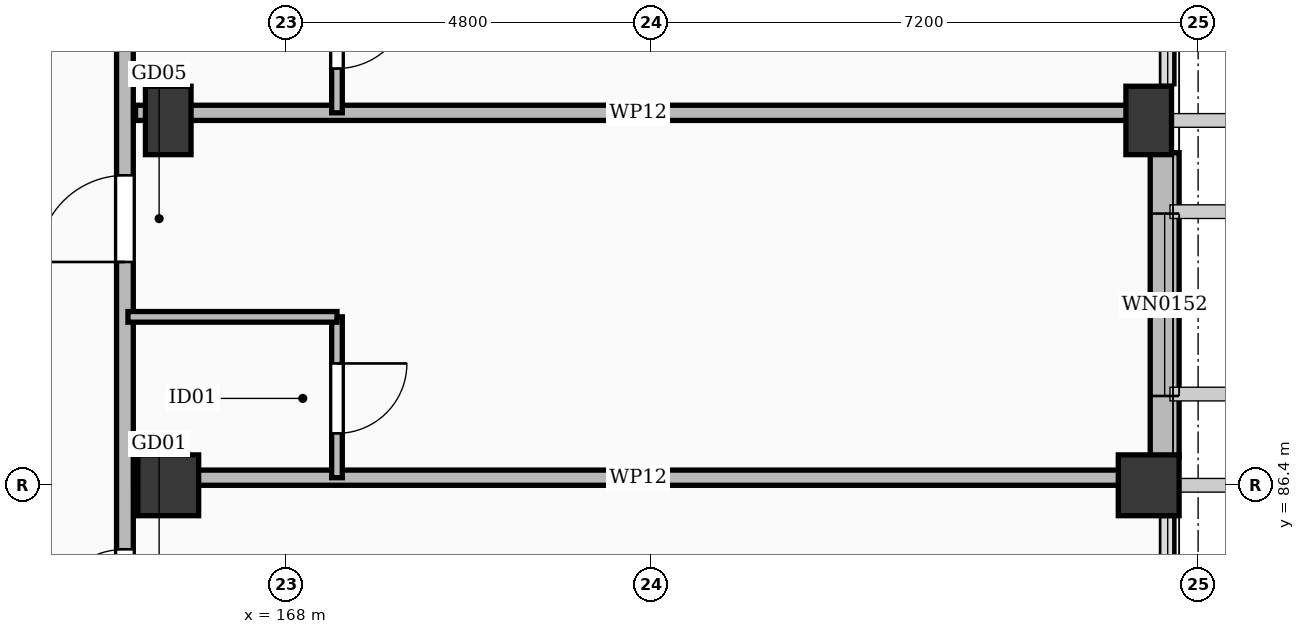
"""IFC4 building model, lengths in metres.
Left out: names, types, materials, properties, quantities, classifications, styles, units other than length and angle.
Written with IfcOpenShell. Run it as: python <this file> out.ifc"""

import sys

from ifc_helpers import new_model, si_unit, direction, frame, frame_2d, origin, origin_2d, place, context, subcontext, project, spatial, rectangle, extrude, element, fill, save


model = new_model("IFC4")
c1 = context("Model", 3, precision=1e-05, world=origin(), true_north=direction((0.0, 1.0)))
c2 = subcontext(c1, "Body", "Model", "MODEL_VIEW")
j1 = project(units=[si_unit("LENGTHUNIT", "METRE"), si_unit("PLANEANGLEUNIT", "RADIAN")], contexts=[c1])
p1 = place(None, origin())
s1 = spatial("IfcSite", under=j1, at=p1, CompositionType="ELEMENT")
p2 = place(p1, origin())
s2 = spatial("IfcBuilding", under=s1, at=p2, CompositionType="ELEMENT")
p3 = place(p2, frame((0.0, 0.0, 21.0)))
s3 = spatial("IfcBuildingStorey", under=s2, at=p3, CompositionType="ELEMENT", Elevation=21.0)
for number, where, z_axis, x_axis in (
    (1, (166.45, 86.4, 0.0), (0.0, 0.0, 1.0), (1.0, 0.0, 0.0)),
    (2, (179.35, 86.4, 0.0), (0.0, 0.0, 1.0), (1.0, 0.0, 0.0)),
):
    element("IfcColumn", number, at=place(p3, frame(where, z_axis=z_axis, x_axis=x_axis)), inside=s3, PredefinedType="COLUMN", context=c2, shape_type="SweptSolid", body=[
        extrude(rectangle(XDim=0.8, YDim=0.8, at=origin_2d()), origin(), (0.0, 0.0, 1.0), 3.6),
    ])
for number, where, z_axis, x_axis in (
    (3, (166.45, 91.2, -0.26), (0.0, 0.0, 1.0), (1.0, 0.0, 0.0)),
    (4, (179.35, 91.2, -0.26), (0.0, 0.0, 1.0), (1.0, 0.0, 0.0)),
):
    element("IfcColumn", number, at=place(p3, frame(where, z_axis=z_axis, x_axis=x_axis)), inside=s3, PredefinedType="COLUMN", context=c2, shape_type="SweptSolid", body=[
        extrude(rectangle(XDim=0.6, YDim=0.9, at=origin_2d()), origin(), (0.0, 0.0, 1.0), 3.86),
    ])
p4 = place(p3, frame((179.56, 90.775, 0.0), z_axis=(0.0, 0.0, 1.0), x_axis=(0.0, -1.0, 0.0)))
e5 = element("IfcWall", 5, at=p4, inside=s3, PredefinedType="SOLIDWALL", context=c2, shape_type="SweptSolid", body=[
    extrude(rectangle(XDim=4.0, YDim=0.38, at=frame_2d((2.0, 0.0))), origin(), (0.0, 0.0, 1.0), 2.582),
])
p5 = place(p4, frame((0.8, 0.0, 0.55)))
e6 = element("IfcOpeningElement", 6, at=p5, cuts=e5, PredefinedType="OPENING", context=c2, shape_type="SweptSolid", body=[
    extrude(rectangle(XDim=2.4, YDim=1.8, at=frame_2d((1.2, 0.9))), frame((0.0, 0.202, 0.0), z_axis=(0.0, -1.0, 0.0), x_axis=(1.0, 0.0, 0.0)), (0.0, 0.0, 1.0), 0.404),
])
p6 = place(p3, frame((165.88, 65.4, 0.0), z_axis=(0.0, 0.0, 1.0), x_axis=(0.0, 1.0, 0.0)))
e7 = element("IfcWall", 7, at=p6, inside=s3, PredefinedType="PARTITIONING", context=c2, shape_type="SweptSolid", body=[
    extrude(rectangle(XDim=60.25, YDim=0.22, at=frame_2d((30.125, 0.0))), origin(), (0.0, 0.0, 1.0), 2.582),
])
p7 = place(p6, frame((4.388, 0.0, 0.0)))
e8 = element("IfcOpeningElement", 8, at=p7, cuts=e7, PredefinedType="OPENING", context=c2, shape_type="SweptSolid", body=[
    extrude(rectangle(XDim=1.28, YDim=2.16, at=frame_2d((0.64, 1.08))), frame((0.0, 0.122, 0.0), z_axis=(0.0, -1.0, 0.0), x_axis=(1.0, 0.0, 0.0)), (0.0, 0.0, 1.0), 0.244),
])
p8 = place(p6, frame((9.538, 0.0, 0.0)))
e9 = element("IfcOpeningElement", 9, at=p8, cuts=e7, PredefinedType="OPENING", context=c2, shape_type="SweptSolid", body=[
    extrude(rectangle(XDim=0.9, YDim=2.08, at=frame_2d((0.45, 1.04))), frame((0.0, 0.122, 0.0), z_axis=(0.0, -1.0, 0.0), x_axis=(1.0, 0.0, 0.0)), (0.0, 0.0, 1.0), 0.244),
])
p9 = place(p6, frame((14.338, 0.0, 0.0)))
e10 = element("IfcOpeningElement", 10, at=p9, cuts=e7, PredefinedType="OPENING", context=c2, shape_type="SweptSolid", body=[
    extrude(rectangle(XDim=1.05, YDim=2.22, at=frame_2d((0.525, 1.11))), frame((0.0, 0.122, 0.0), z_axis=(0.0, -1.0, 0.0), x_axis=(1.0, 0.0, 0.0)), (0.0, 0.0, 1.0), 0.244),
])
p10 = place(p6, frame((19.138, 0.0, 0.0)))
e11 = element("IfcOpeningElement", 11, at=p10, cuts=e7, PredefinedType="OPENING", context=c2, shape_type="SweptSolid", body=[
    extrude(rectangle(XDim=1.02, YDim=2.2, at=frame_2d((0.51, 1.1))), frame((0.0, 0.122, 0.0), z_axis=(0.0, -1.0, 0.0), x_axis=(1.0, 0.0, 0.0)), (0.0, 0.0, 1.0), 0.244),
])
p11 = place(p6, frame((23.938, 0.0, 0.0)))
e12 = element("IfcOpeningElement", 12, at=p11, cuts=e7, PredefinedType="OPENING", context=c2, shape_type="SweptSolid", body=[
    extrude(rectangle(XDim=1.14, YDim=2.26, at=frame_2d((0.57, 1.13))), frame((0.0, 0.122, 0.0), z_axis=(0.0, -1.0, 0.0), x_axis=(1.0, 0.0, 0.0)), (0.0, 0.0, 1.0), 0.244),
])
p12 = place(p6, frame((28.738, 0.0, 0.0)))
e13 = element("IfcOpeningElement", 13, at=p12, cuts=e7, PredefinedType="OPENING", context=c2, shape_type="SweptSolid", body=[
    extrude(rectangle(XDim=0.98, YDim=2.15, at=frame_2d((0.49, 1.075))), frame((0.0, 0.122, 0.0), z_axis=(0.0, -1.0, 0.0), x_axis=(1.0, 0.0, 0.0)), (0.0, 0.0, 1.0), 0.244),
])
p13 = place(p6, frame((33.188, 0.0, 0.0)))
e14 = element("IfcOpeningElement", 14, at=p13, cuts=e7, PredefinedType="OPENING", context=c2, shape_type="SweptSolid", body=[
    extrude(rectangle(XDim=1.28, YDim=2.16, at=frame_2d((0.64, 1.08))), frame((0.0, 0.122, 0.0), z_axis=(0.0, -1.0, 0.0), x_axis=(1.0, 0.0, 0.0)), (0.0, 0.0, 1.0), 0.244),
])
p14 = place(p6, frame((38.338, 0.0, 0.0)))
e15 = element("IfcOpeningElement", 15, at=p14, cuts=e7, PredefinedType="OPENING", context=c2, shape_type="SweptSolid", body=[
    extrude(rectangle(XDim=0.9, YDim=2.08, at=frame_2d((0.45, 1.04))), frame((0.0, 0.122, 0.0), z_axis=(0.0, -1.0, 0.0), x_axis=(1.0, 0.0, 0.0)), (0.0, 0.0, 1.0), 0.244),
])
p15 = place(p6, frame((43.138, 0.0, 0.0)))
e16 = element("IfcOpeningElement", 16, at=p15, cuts=e7, PredefinedType="OPENING", context=c2, shape_type="SweptSolid", body=[
    extrude(rectangle(XDim=1.05, YDim=2.22, at=frame_2d((0.525, 1.11))), frame((0.0, 0.122, 0.0), z_axis=(0.0, -1.0, 0.0), x_axis=(1.0, 0.0, 0.0)), (0.0, 0.0, 1.0), 0.244),
])
p16 = place(p6, frame((47.938, 0.0, 0.0)))
e17 = element("IfcOpeningElement", 17, at=p16, cuts=e7, PredefinedType="OPENING", context=c2, shape_type="SweptSolid", body=[
    extrude(rectangle(XDim=1.02, YDim=2.2, at=frame_2d((0.51, 1.1))), frame((0.0, 0.122, 0.0), z_axis=(0.0, -1.0, 0.0), x_axis=(1.0, 0.0, 0.0)), (0.0, 0.0, 1.0), 0.244),
])
p17 = place(p6, frame((52.738, 0.0, 0.0)))
e18 = element("IfcOpeningElement", 18, at=p17, cuts=e7, PredefinedType="OPENING", context=c2, shape_type="SweptSolid", body=[
    extrude(rectangle(XDim=1.14, YDim=2.26, at=frame_2d((0.57, 1.13))), frame((0.0, 0.122, 0.0), z_axis=(0.0, -1.0, 0.0), x_axis=(1.0, 0.0, 0.0)), (0.0, 0.0, 1.0), 0.244),
])
p18 = place(p6, frame((57.538, 0.0, 0.0)))
e19 = element("IfcOpeningElement", 19, at=p18, cuts=e7, PredefinedType="OPENING", context=c2, shape_type="SweptSolid", body=[
    extrude(rectangle(XDim=0.98, YDim=2.15, at=frame_2d((0.49, 1.075))), frame((0.0, 0.122, 0.0), z_axis=(0.0, -1.0, 0.0), x_axis=(1.0, 0.0, 0.0)), (0.0, 0.0, 1.0), 0.244),
])
p19 = place(p3, frame((166.02, 86.5, 0.0), z_axis=(0.0, 0.0, 1.0), x_axis=(1.0, 0.0, 0.0)))
e20 = element("IfcWall", 20, at=p19, inside=s3, PredefinedType="PARTITIONING", context=c2, shape_type="SweptSolid", body=[
    extrude(rectangle(XDim=13.23, YDim=0.2, at=frame_2d((6.615, 0.0))), origin(), (0.0, 0.0, 1.0), 2.582),
])
p20 = place(p3, frame((168.67, 86.5, 0.0), z_axis=(0.0, 0.0, 1.0), x_axis=(0.0, 1.0, 0.0)))
e21 = element("IfcWall", 21, at=p20, inside=s3, PredefinedType="PARTITIONING", context=c2, shape_type="SweptSolid", body=[
    extrude(rectangle(XDim=2.116, YDim=0.14, at=frame_2d((1.058, 0.0))), origin(), (0.0, 0.0, 1.0), 2.652),
])
p21 = place(p20, frame((0.583, 0.0, 0.0)))
e22 = element("IfcOpeningElement", 22, at=p21, cuts=e21, PredefinedType="OPENING", context=c2, shape_type="SweptSolid", body=[
    extrude(rectangle(XDim=0.92, YDim=2.1, at=frame_2d((0.46, 1.05))), frame((0.0, 0.082, 0.0), z_axis=(0.0, -1.0, 0.0), x_axis=(1.0, 0.0, 0.0)), (0.0, 0.0, 1.0), 0.164),
])
p22 = place(p3, frame((165.92, 88.616, 0.0), z_axis=(0.0, 0.0, 1.0), x_axis=(1.0, 0.0, 0.0)))
e23 = element("IfcWall", 23, at=p22, inside=s3, PredefinedType="PARTITIONING", context=c2, shape_type="SweptSolid", body=[
    extrude(rectangle(XDim=2.75, YDim=0.14, at=frame_2d((1.375, 0.0))), origin(), (0.0, 0.0, 1.0), 2.652),
])
p23 = place(p3, frame((166.02, 91.3, 0.0), z_axis=(0.0, 0.0, 1.0), x_axis=(1.0, 0.0, 0.0)))
e24 = element("IfcWall", 24, at=p23, inside=s3, PredefinedType="PARTITIONING", context=c2, shape_type="SweptSolid", body=[
    extrude(rectangle(XDim=13.23, YDim=0.2, at=frame_2d((6.615, 0.0))), origin(), (0.0, 0.0, 1.0), 2.582),
])
p24 = place(p3, frame((168.67, 91.3, 0.0), z_axis=(0.0, 0.0, 1.0), x_axis=(0.0, 1.0, 0.0)))
e25 = element("IfcWall", 25, at=p24, inside=s3, PredefinedType="PARTITIONING", context=c2, shape_type="SweptSolid", body=[
    extrude(rectangle(XDim=2.116, YDim=0.14, at=frame_2d((1.058, 0.0))), origin(), (0.0, 0.0, 1.0), 2.652),
])
p25 = place(p24, frame((0.583, 0.0, 0.0)))
e26 = element("IfcOpeningElement", 26, at=p25, cuts=e25, PredefinedType="OPENING", context=c2, shape_type="SweptSolid", body=[
    extrude(rectangle(XDim=0.96, YDim=2.12, at=frame_2d((0.48, 1.06))), frame((0.0, 0.082, 0.0), z_axis=(0.0, -1.0, 0.0), x_axis=(1.0, 0.0, 0.0)), (0.0, 0.0, 1.0), 0.164),
])
p26 = place(p5, origin())
e27 = element("IfcWindow", 27, at=p26, inside=s3, PartitioningType="SINGLE_PANEL", PredefinedType="WINDOW", context=c2, shape_type="SweptSolid", body=[
    extrude(rectangle(XDim=2.4, YDim=1.8, at=frame_2d((1.2, 0.9))), frame((0.0, 0.03, 0.0), z_axis=(0.0, -1.0, 0.0), x_axis=(1.0, 0.0, 0.0)), (0.0, 0.0, 1.0), 0.06),
])
fill(e6, e27)
p27 = place(p10, origin())
e28 = element("IfcDoor", 28, at=p27, inside=s3, OperationType="SINGLE_SWING_LEFT", PredefinedType="DOOR", context=c2, shape_type="SweptSolid", body=[
    extrude(rectangle(XDim=1.02, YDim=2.2, at=frame_2d((0.51, 1.1))), frame((0.0, 0.025, 0.0), z_axis=(0.0, -1.0, 0.0), x_axis=(1.0, 0.0, 0.0)), (0.0, 0.0, 1.0), 0.05),
])
fill(e11, e28)
p28 = place(p11, origin())
e29 = element("IfcDoor", 29, at=p28, inside=s3, OperationType="SINGLE_SWING_LEFT", PredefinedType="DOOR", context=c2, shape_type="SweptSolid", body=[
    extrude(rectangle(XDim=1.14, YDim=2.26, at=frame_2d((0.57, 1.13))), frame((0.0, 0.025, 0.0), z_axis=(0.0, -1.0, 0.0), x_axis=(1.0, 0.0, 0.0)), (0.0, 0.0, 1.0), 0.05),
])
fill(e12, e29)
p29 = place(p21, frame((0.92, 0.0, 0.0), z_axis=(0.0, 0.0, 1.0), x_axis=(-1.0, 0.0, 0.0)))
e30 = element("IfcDoor", 30, at=p29, inside=s3, OperationType="SINGLE_SWING_RIGHT", PredefinedType="DOOR", context=c2, shape_type="SweptSolid", body=[
    extrude(rectangle(XDim=0.92, YDim=2.1, at=frame_2d((0.46, 1.05))), frame((0.0, 0.025, 0.0), z_axis=(0.0, -1.0, 0.0), x_axis=(1.0, 0.0, 0.0)), (0.0, 0.0, 1.0), 0.05),
])
fill(e22, e30)
p30 = place(p25, frame((0.96, 0.0, 0.0), z_axis=(0.0, 0.0, 1.0), x_axis=(-1.0, 0.0, 0.0)))
e31 = element("IfcDoor", 31, at=p30, inside=s3, OperationType="SINGLE_SWING_RIGHT", PredefinedType="DOOR", context=c2, shape_type="SweptSolid", body=[
    extrude(rectangle(XDim=0.96, YDim=2.12, at=frame_2d((0.48, 1.06))), frame((0.0, 0.025, 0.0), z_axis=(0.0, -1.0, 0.0), x_axis=(1.0, 0.0, 0.0)), (0.0, 0.0, 1.0), 0.05),
])
fill(e26, e31)
save(model, sys.argv[1])
